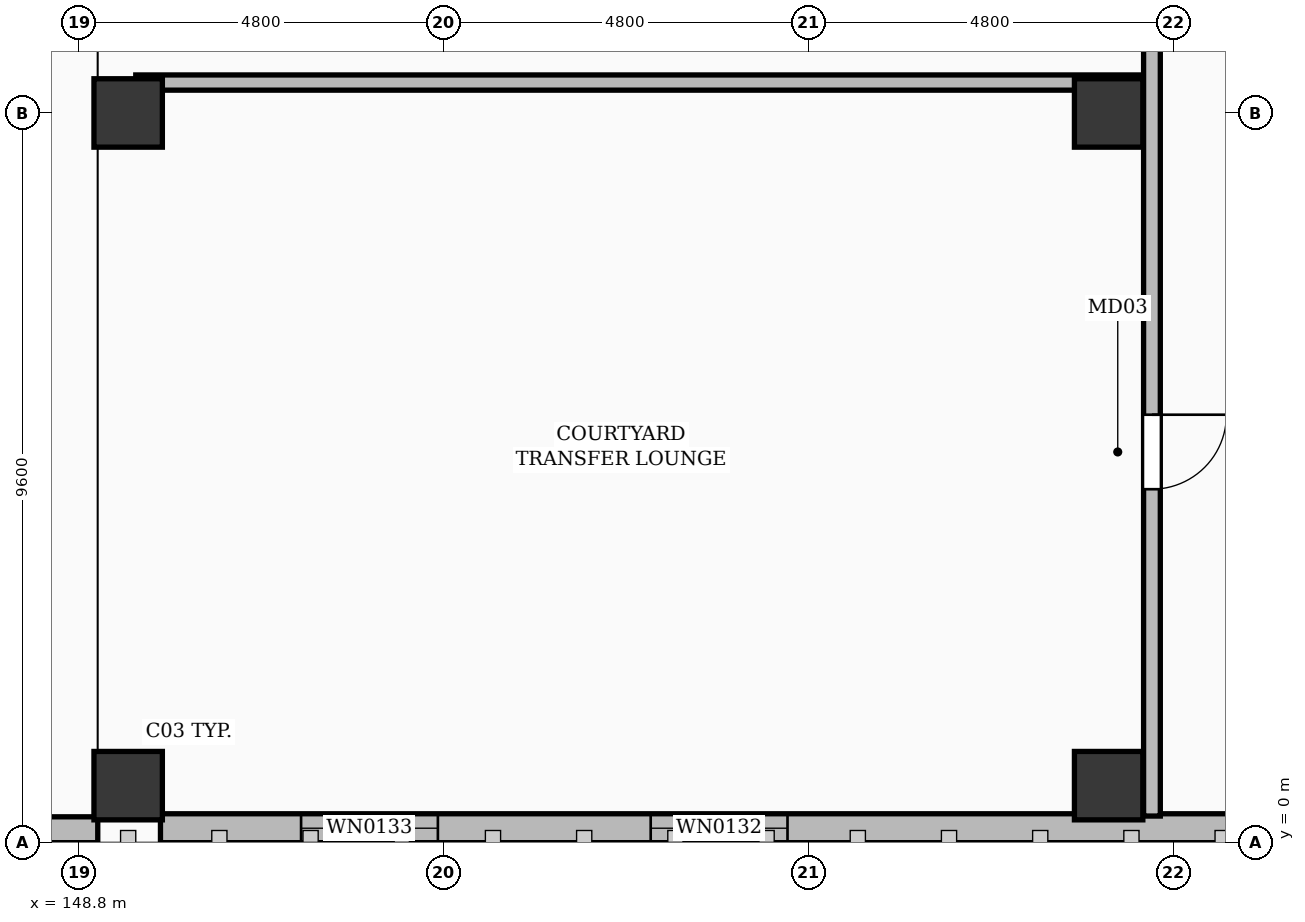
"""IFC4 building model, lengths in metres.
Left out: names, types, materials, properties, quantities, classifications, styles, units other than length and angle.
Written with IfcOpenShell. Run it as: python <this file> out.ifc"""

import sys

from ifc_helpers import new_model, si_unit, direction, frame, frame_2d, origin, origin_2d, place, context, subcontext, project, spatial, rectangle, extrude, element, fill, save


model = new_model("IFC4")
c1 = context("Model", 3, precision=1e-05, world=origin(), true_north=direction((0.0, 1.0)))
c2 = subcontext(c1, "Body", "Model", "MODEL_VIEW")
j1 = project(units=[si_unit("LENGTHUNIT", "METRE"), si_unit("PLANEANGLEUNIT", "RADIAN")], contexts=[c1])
p1 = place(None, origin())
s1 = spatial("IfcSite", under=j1, at=p1, CompositionType="ELEMENT")
p2 = place(p1, origin())
s2 = spatial("IfcBuilding", under=s1, at=p2, CompositionType="ELEMENT")
p3 = place(p2, frame((0.0, 0.0, 16.2)))
s3 = spatial("IfcBuildingStorey", under=s2, at=p3, CompositionType="ELEMENT", Elevation=16.2)
for number, where, z_axis, x_axis in (
    (1, (149.45, 0.75, 0.0), (0.0, 0.0, 1.0), (1.0, 0.0, 0.0)),
    (2, (149.45, 9.6, 0.0), (0.0, 0.0, 1.0), (1.0, 0.0, 0.0)),
    (3, (162.35, 0.75, 0.0), (0.0, 0.0, 1.0), (1.0, 0.0, 0.0)),
    (4, (162.35, 9.6, 0.0), (0.0, 0.0, 1.0), (1.0, 0.0, 0.0)),
):
    element("IfcColumn", number, at=place(p3, frame(where, z_axis=z_axis, x_axis=x_axis)), inside=s3, PredefinedType="COLUMN", context=c2, shape_type="SweptSolid", body=[
        extrude(rectangle(XDim=0.9, YDim=0.9, at=origin_2d()), origin(), (0.0, 0.0, 1.0), 4.8),
    ])
p4 = place(p3, frame((149.05, 0.17, 0.0), z_axis=(0.0, 0.0, 1.0), x_axis=(-1.0, 0.0, 0.0)))
e5 = element("IfcWall", 5, at=p4, inside=s3, PredefinedType="SOLIDWALL", context=c2, shape_type="SweptSolid", body=[
    extrude(rectangle(XDim=43.3, YDim=0.34, at=frame_2d((21.65, 0.0))), origin(), (0.0, 0.0, 1.0), 3.032),
])
p5 = place(p3, frame((178.925, 0.19, 0.0), z_axis=(0.0, 0.0, 1.0), x_axis=(-1.0, 0.0, 0.0)))
e6 = element("IfcWall", 6, at=p5, inside=s3, PredefinedType="SOLIDWALL", context=c2, shape_type="SweptSolid", body=[
    extrude(rectangle(XDim=29.05, YDim=0.38, at=frame_2d((14.525, 0.0))), origin(), (0.0, 0.0, 1.0), 3.032),
])
p6 = place(p5, frame((4.0, 0.0, 0.55)))
e7 = element("IfcOpeningElement", 7, at=p6, cuts=e6, PredefinedType="OPENING", context=c2, shape_type="SweptSolid", body=[
    extrude(rectangle(XDim=1.8, YDim=1.76, at=frame_2d((0.9, 0.88))), frame((0.0, 0.202, 0.0), z_axis=(0.0, -1.0, 0.0), x_axis=(1.0, 0.0, 0.0)), (0.0, 0.0, 1.0), 0.404),
])
p7 = place(p5, frame((9.6, 0.0, 0.55)))
e8 = element("IfcOpeningElement", 8, at=p7, cuts=e6, PredefinedType="OPENING", context=c2, shape_type="SweptSolid", body=[
    extrude(rectangle(XDim=1.8, YDim=1.76, at=frame_2d((0.9, 0.88))), frame((0.0, 0.202, 0.0), z_axis=(0.0, -1.0, 0.0), x_axis=(1.0, 0.0, 0.0)), (0.0, 0.0, 1.0), 0.404),
])
p8 = place(p5, frame((20.8, 0.0, 0.55)))
e9 = element("IfcOpeningElement", 9, at=p8, cuts=e6, PredefinedType="OPENING", context=c2, shape_type="SweptSolid", body=[
    extrude(rectangle(XDim=1.8, YDim=1.76, at=frame_2d((0.9, 0.88))), frame((0.0, 0.202, 0.0), z_axis=(0.0, -1.0, 0.0), x_axis=(1.0, 0.0, 0.0)), (0.0, 0.0, 1.0), 0.404),
])
p9 = place(p5, frame((25.4, 0.0, 0.55)))
e10 = element("IfcOpeningElement", 10, at=p9, cuts=e6, PredefinedType="OPENING", context=c2, shape_type="SweptSolid", body=[
    extrude(rectangle(XDim=1.8, YDim=1.76, at=frame_2d((0.9, 0.88))), frame((0.0, 0.202, 0.0), z_axis=(0.0, -1.0, 0.0), x_axis=(1.0, 0.0, 0.0)), (0.0, 0.0, 1.0), 0.404),
])
p10 = place(p3, frame((162.92, 0.35, 0.0), z_axis=(0.0, 0.0, 1.0), x_axis=(0.0, 1.0, 0.0)))
e11 = element("IfcWall", 11, at=p10, inside=s3, PredefinedType="PARTITIONING", context=c2, shape_type="SweptSolid", body=[
    extrude(rectangle(XDim=72.85, YDim=0.22, at=frame_2d((36.425, 0.0))), origin(), (0.0, 0.0, 1.0), 3.732),
])
p11 = place(p10, frame((4.3, 0.0, 0.0)))
e12 = element("IfcOpeningElement", 12, at=p11, cuts=e11, PredefinedType="OPENING", context=c2, shape_type="SweptSolid", body=[
    extrude(rectangle(XDim=0.98, YDim=2.15, at=frame_2d((0.49, 1.075))), frame((0.0, 0.122, 0.0), z_axis=(0.0, -1.0, 0.0), x_axis=(1.0, 0.0, 0.0)), (0.0, 0.0, 1.0), 0.244),
])
p12 = place(p10, frame((11.15, 0.0, 0.0)))
e13 = element("IfcOpeningElement", 13, at=p12, cuts=e11, PredefinedType="OPENING", context=c2, shape_type="SweptSolid", body=[
    extrude(rectangle(XDim=1.28, YDim=2.16, at=frame_2d((0.64, 1.08))), frame((0.0, 0.122, 0.0), z_axis=(0.0, -1.0, 0.0), x_axis=(1.0, 0.0, 0.0)), (0.0, 0.0, 1.0), 0.244),
])
p13 = place(p10, frame((39.55, 0.0, 0.0)))
e14 = element("IfcOpeningElement", 14, at=p13, cuts=e11, PredefinedType="OPENING", context=c2, shape_type="SweptSolid", body=[
    extrude(rectangle(XDim=1.28, YDim=2.16, at=frame_2d((0.64, 1.08))), frame((0.0, 0.122, 0.0), z_axis=(0.0, -1.0, 0.0), x_axis=(1.0, 0.0, 0.0)), (0.0, 0.0, 1.0), 0.244),
])
p14 = place(p10, frame((44.75, 0.0, 0.0)))
e15 = element("IfcOpeningElement", 15, at=p14, cuts=e11, PredefinedType="OPENING", context=c2, shape_type="SweptSolid", body=[
    extrude(rectangle(XDim=0.9, YDim=2.08, at=frame_2d((0.45, 1.04))), frame((0.0, 0.122, 0.0), z_axis=(0.0, -1.0, 0.0), x_axis=(1.0, 0.0, 0.0)), (0.0, 0.0, 1.0), 0.244),
])
p15 = place(p10, frame((69.55, 0.0, 0.0)))
e16 = element("IfcOpeningElement", 16, at=p15, cuts=e11, PredefinedType="OPENING", context=c2, shape_type="SweptSolid", body=[
    extrude(rectangle(XDim=0.9, YDim=2.08, at=frame_2d((0.45, 1.04))), frame((0.0, 0.122, 0.0), z_axis=(0.0, -1.0, 0.0), x_axis=(1.0, 0.0, 0.0)), (0.0, 0.0, 1.0), 0.244),
])
p16 = place(p3, frame((149.55, 10.0, 0.0), z_axis=(0.0, 0.0, 1.0), x_axis=(1.0, 0.0, 0.0)))
e17 = element("IfcWall", 17, at=p16, inside=s3, PredefinedType="PARTITIONING", context=c2, shape_type="SweptSolid", body=[
    extrude(rectangle(XDim=13.23, YDim=0.2, at=frame_2d((6.615, 0.0))), origin(), (0.0, 0.0, 1.0), 3.032),
])
p17 = place(p8, origin())
e18 = element("IfcWindow", 18, at=p17, inside=s3, PartitioningType="SINGLE_PANEL", PredefinedType="WINDOW", context=c2, shape_type="SweptSolid", body=[
    extrude(rectangle(XDim=1.8, YDim=1.76, at=frame_2d((0.9, 0.88))), frame((0.0, 0.03, 0.0), z_axis=(0.0, -1.0, 0.0), x_axis=(1.0, 0.0, 0.0)), (0.0, 0.0, 1.0), 0.06),
])
fill(e9, e18)
p18 = place(p9, origin())
e19 = element("IfcWindow", 19, at=p18, inside=s3, PartitioningType="SINGLE_PANEL", PredefinedType="WINDOW", context=c2, shape_type="SweptSolid", body=[
    extrude(rectangle(XDim=1.8, YDim=1.76, at=frame_2d((0.9, 0.88))), frame((0.0, 0.03, 0.0), z_axis=(0.0, -1.0, 0.0), x_axis=(1.0, 0.0, 0.0)), (0.0, 0.0, 1.0), 0.06),
])
fill(e10, e19)
p19 = place(p11, frame((0.98, 0.0, 0.0), z_axis=(0.0, 0.0, 1.0), x_axis=(-1.0, 0.0, 0.0)))
e20 = element("IfcDoor", 20, at=p19, inside=s3, OperationType="SINGLE_SWING_RIGHT", PredefinedType="DOOR", context=c2, shape_type="SweptSolid", body=[
    extrude(rectangle(XDim=0.98, YDim=2.15, at=frame_2d((0.49, 1.075))), frame((0.0, 0.025, 0.0), z_axis=(0.0, -1.0, 0.0), x_axis=(1.0, 0.0, 0.0)), (0.0, 0.0, 1.0), 0.05),
])
fill(e12, e20)
save(model, sys.argv[1])
